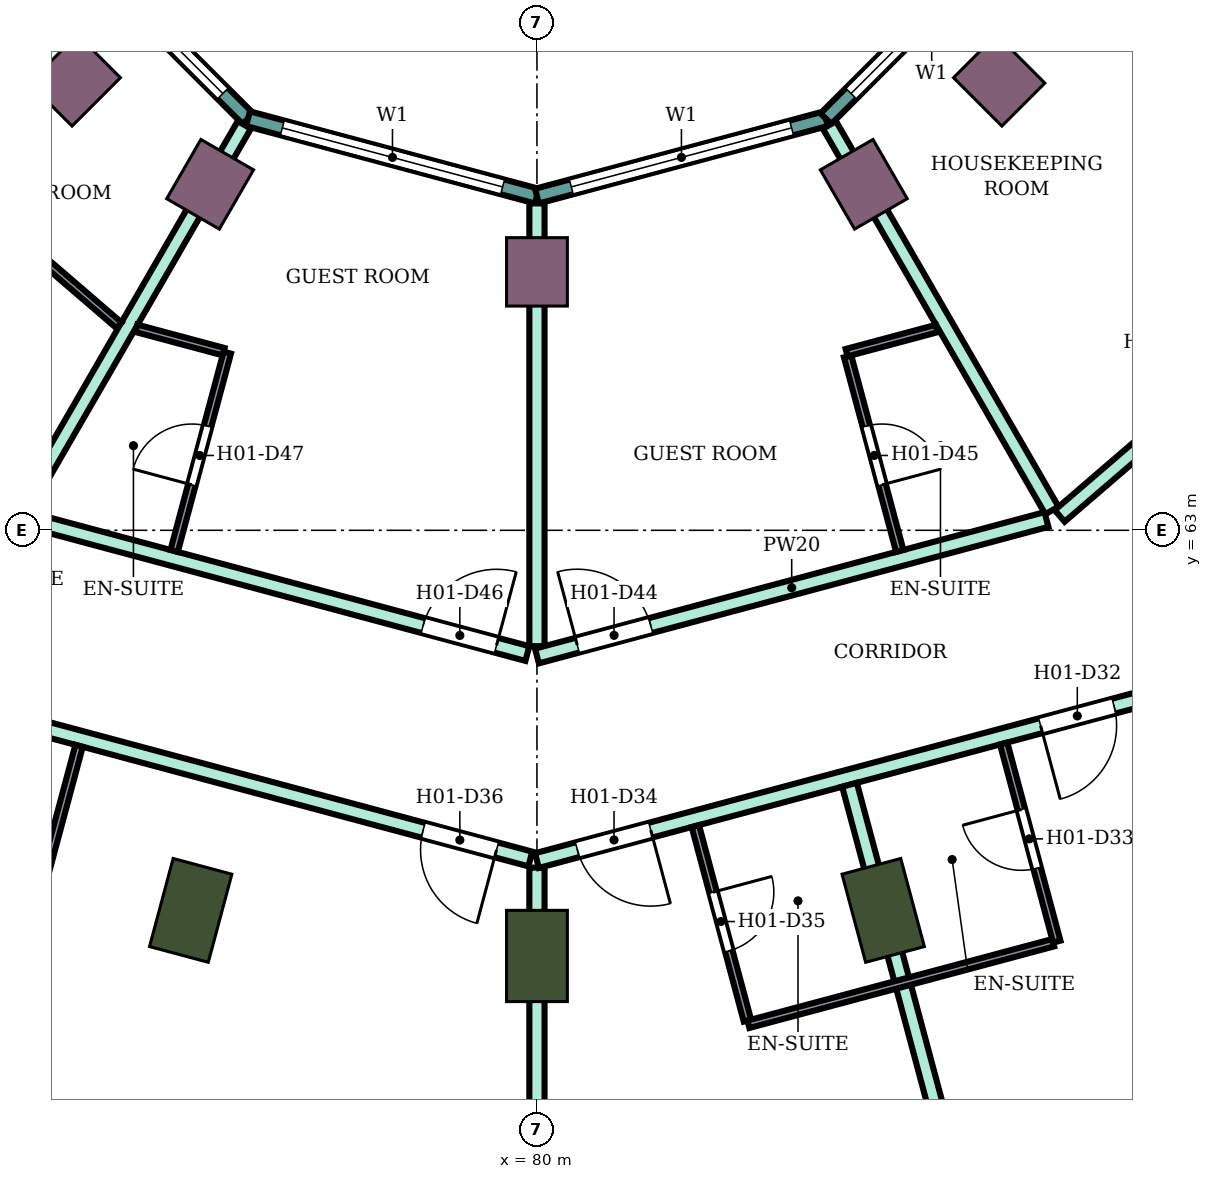
"""IFC4 building model, lengths in metres.
Left out: names, types, materials, properties, quantities, classifications, styles, units other than length and angle.
Written with IfcOpenShell. Run it as: python <this file> out.ifc"""

import sys

from ifc_helpers import new_model, si_unit, direction, frame, frame_2d, origin, origin_2d, place, context, subcontext, project, spatial, rectangle, extrude, element, fill, save


model = new_model("IFC4")
c1 = context("Model", 3, precision=1e-05, world=origin(), true_north=direction((0.0, 1.0)))
c2 = subcontext(c1, "Body", "Model", "MODEL_VIEW")
j1 = project(units=[si_unit("LENGTHUNIT", "METRE"), si_unit("PLANEANGLEUNIT", "RADIAN")], contexts=[c1])
p1 = place(None, origin())
s1 = spatial("IfcSite", under=j1, at=p1, CompositionType="ELEMENT")
p2 = place(p1, origin())
s2 = spatial("IfcBuilding", under=s1, at=p2, CompositionType="ELEMENT")
p3 = place(p2, frame((0.0, 0.0, 36.4)))
s3 = spatial("IfcBuildingStorey", under=s2, at=p3, CompositionType="ELEMENT", Elevation=36.4)
for number, where, z_axis, x_axis in (
    (1, (75.445, 58.0, 0.0), (0.0, 0.0, 1.0), (-0.259, -0.966, 0.0)),
    (2, (80.0, 57.4, 0.0), (0.0, 0.0, 1.0), (0.0, -1.0, 0.0)),
    (3, (84.555, 58.0, 0.0), (0.0, 0.0, 1.0), (0.259, -0.966, 0.0)),
):
    element("IfcColumn", number, at=place(p3, frame(where, z_axis=z_axis, x_axis=x_axis)), inside=s3, PredefinedType="COLUMN", context=c2, shape_type="SweptSolid", body=[
        extrude(rectangle(XDim=1.2, YDim=0.8, at=origin_2d()), origin(), (0.0, 0.0, 1.0), 3.8),
    ])
for number, where, z_axis, x_axis in (
    (4, (73.919, 68.919, 0.0), (0.0, 0.0, 1.0), (-0.707, -0.707, 0.0)),
    (5, (75.7, 67.552, 0.0), (0.0, 0.0, 1.0), (-0.5, -0.866, 0.0)),
    (6, (80.0, 66.4, 0.0), (0.0, 0.0, 1.0), (0.0, -1.0, 0.0)),
    (7, (84.3, 67.552, 0.0), (0.0, 0.0, 1.0), (0.5, -0.866, 0.0)),
    (8, (86.081, 68.919, 0.0), (0.0, 0.0, 1.0), (0.707, -0.707, 0.0)),
):
    element("IfcColumn", number, at=place(p3, frame(where, z_axis=z_axis, x_axis=x_axis)), inside=s3, PredefinedType="COLUMN", context=c2, shape_type="SweptSolid", body=[
        extrude(rectangle(XDim=0.9, YDim=0.8, at=origin_2d()), origin(), (0.0, 0.0, 1.0), 3.8),
    ])
p4 = place(p3, frame((73.415, 71.198, 0.0), z_axis=(0.0, 0.0, 1.0), x_axis=(0.707106781187, -0.707106781187, 0.0)))
e9 = element("IfcWall", 9, at=p4, inside=s3, PredefinedType="NOTDEFINED", context=c2, shape_type="SweptSolid", body=[
    extrude(rectangle(XDim=3.936, YDim=0.2, at=frame_2d((1.968, 0.0))), origin(), (0.0, 0.0, 1.0), 3.8),
])
p5 = place(p4, frame((0.468, 0.0, 0.9)))
e10 = element("IfcOpeningElement", 10, at=p5, cuts=e9, PredefinedType="OPENING", context=c2, shape_type="SweptSolid", body=[
    extrude(rectangle(XDim=3.0, YDim=2.3, at=frame_2d((1.5, 1.15))), frame((0.0, 0.11, 0.0), z_axis=(0.0, -1.0, 0.0), x_axis=(1.0, 0.0, 0.0)), (0.0, 0.0, 1.0), 0.22),
])
p6 = place(p3, frame((76.198, 68.415, 0.0), z_axis=(0.0, 0.0, 1.0), x_axis=(0.965933654434, -0.258789828301, 0.0)))
e11 = element("IfcWall", 11, at=p6, inside=s3, PredefinedType="NOTDEFINED", context=c2, shape_type="SweptSolid", body=[
    extrude(rectangle(XDim=3.936, YDim=0.2, at=frame_2d((1.968, 0.0))), origin(), (0.0, 0.0, 1.0), 3.8),
])
p7 = place(p6, frame((0.468, 0.0, 0.9)))
e12 = element("IfcOpeningElement", 12, at=p7, cuts=e11, PredefinedType="OPENING", context=c2, shape_type="SweptSolid", body=[
    extrude(rectangle(XDim=3.0, YDim=2.3, at=frame_2d((1.5, 1.15))), frame((0.0, 0.11, 0.0), z_axis=(0.0, -1.0, 0.0), x_axis=(1.0, 0.0, 0.0)), (0.0, 0.0, 1.0), 0.22),
])
p8 = place(p3, frame((80.0, 67.396, 0.0), z_axis=(0.0, 0.0, 1.0), x_axis=(0.965933654434, 0.258789828301, 0.0)))
e13 = element("IfcWall", 13, at=p8, inside=s3, PredefinedType="NOTDEFINED", context=c2, shape_type="SweptSolid", body=[
    extrude(rectangle(XDim=3.936, YDim=0.2, at=frame_2d((1.968, 0.0))), origin(), (0.0, 0.0, 1.0), 3.8),
])
p9 = place(p8, frame((0.468, 0.0, 0.9)))
e14 = element("IfcOpeningElement", 14, at=p9, cuts=e13, PredefinedType="OPENING", context=c2, shape_type="SweptSolid", body=[
    extrude(rectangle(XDim=3.0, YDim=2.3, at=frame_2d((1.5, 1.15))), frame((0.0, 0.11, 0.0), z_axis=(0.0, -1.0, 0.0), x_axis=(1.0, 0.0, 0.0)), (0.0, 0.0, 1.0), 0.22),
])
p10 = place(p3, frame((83.802, 68.415, 0.0), z_axis=(0.0, 0.0, 1.0), x_axis=(0.707106781187, 0.707106781187, 0.0)))
e15 = element("IfcWall", 15, at=p10, inside=s3, PredefinedType="NOTDEFINED", context=c2, shape_type="SweptSolid", body=[
    extrude(rectangle(XDim=3.936, YDim=0.2, at=frame_2d((1.968, 0.0))), origin(), (0.0, 0.0, 1.0), 3.8),
])
p11 = place(p10, frame((0.468, 0.0, 0.9)))
e16 = element("IfcOpeningElement", 16, at=p11, cuts=e15, PredefinedType="OPENING", context=c2, shape_type="SweptSolid", body=[
    extrude(rectangle(XDim=3.0, YDim=2.3, at=frame_2d((1.5, 1.15))), frame((0.0, 0.11, 0.0), z_axis=(0.0, -1.0, 0.0), x_axis=(1.0, 0.0, 0.0)), (0.0, 0.0, 1.0), 0.22),
])
p12 = place(p3, frame((71.877, 60.831, 0.0), z_axis=(0.0, 0.0, 1.0), x_axis=(0.965852509869, -0.259092510851, 0.0)))
e17 = element("IfcWall", 17, at=p12, inside=s3, PredefinedType="PARTITIONING", context=c2, shape_type="SweptSolid", body=[
    extrude(rectangle(XDim=8.32, YDim=0.2, at=frame_2d((4.16, 0.0))), origin(), (0.0, 0.0, 1.0), 3.35),
])
p13 = place(p12, frame((6.86, 0.0, 0.0)))
e18 = element("IfcOpeningElement", 18, at=p13, cuts=e17, PredefinedType="OPENING", context=c2, shape_type="SweptSolid", body=[
    extrude(rectangle(XDim=1.0, YDim=2.1, at=frame_2d((0.5, 1.05))), frame((0.0, 0.11, 0.0), z_axis=(0.0, -1.0, 0.0), x_axis=(1.0, 0.0, 0.0)), (0.0, 0.0, 1.0), 0.22),
])
p14 = place(p3, frame((73.297, 63.143, 0.0), z_axis=(0.0, 0.0, 1.0), x_axis=(0.965859030528, -0.25906820173, 0.0)))
e19 = element("IfcWall", 19, at=p14, inside=s3, PredefinedType="PARTITIONING", context=c2, shape_type="SweptSolid", body=[
    extrude(rectangle(XDim=6.81, YDim=0.2, at=frame_2d((3.405, 0.0))), origin(), (0.0, 0.0, 1.0), 3.35),
])
p15 = place(p14, frame((5.39, 0.0, 0.0)))
e20 = element("IfcOpeningElement", 20, at=p15, cuts=e19, PredefinedType="OPENING", context=c2, shape_type="SweptSolid", body=[
    extrude(rectangle(XDim=1.0, YDim=2.1, at=frame_2d((0.5, 1.05))), frame((0.0, 0.11, 0.0), z_axis=(0.0, -1.0, 0.0), x_axis=(1.0, 0.0, 0.0)), (0.0, 0.0, 1.0), 0.22),
])
p16 = place(p3, frame((73.171, 63.177, 0.0), z_axis=(0.0, 0.0, 1.0), x_axis=(0.500257106344, 0.865876912472, 0.0)))
e21 = element("IfcWall", 21, at=p16, inside=s3, PredefinedType="PARTITIONING", context=c2, shape_type="SweptSolid", body=[
    extrude(rectangle(XDim=5.955, YDim=0.2, at=frame_2d((2.978, 0.0))), origin(), (0.0, 0.0, 1.0), 3.35),
])
p17 = place(p3, frame((80.0, 51.801, 0.0), z_axis=(0.0, 0.0, 1.0), x_axis=(0.0, 1.0, 0.0)))
e22 = element("IfcWall", 22, at=p17, inside=s3, PredefinedType="PARTITIONING", context=c2, shape_type="SweptSolid", body=[
    extrude(rectangle(XDim=6.762, YDim=0.2, at=frame_2d((3.381, 0.0))), origin(), (0.0, 0.0, 1.0), 3.35),
])
p18 = place(p3, frame((80.0, 58.655, 0.0), z_axis=(0.0, 0.0, 1.0), x_axis=(0.965974635626, 0.258636817424, 0.0)))
e23 = element("IfcWall", 23, at=p18, inside=s3, PredefinedType="PARTITIONING", context=c2, shape_type="SweptSolid", body=[
    extrude(rectangle(XDim=8.36, YDim=0.2, at=frame_2d((4.18, 0.0))), origin(), (0.0, 0.0, 1.0), 3.35),
])
p19 = place(p18, frame((6.86, 0.0, 0.0)))
e24 = element("IfcOpeningElement", 24, at=p19, cuts=e23, PredefinedType="OPENING", context=c2, shape_type="SweptSolid", body=[
    extrude(rectangle(XDim=1.0, YDim=2.1, at=frame_2d((0.5, 1.05))), frame((0.0, 0.11, 0.0), z_axis=(0.0, -1.0, 0.0), x_axis=(1.0, 0.0, 0.0)), (0.0, 0.0, 1.0), 0.22),
])
p20 = place(p18, frame((0.55, 0.0, 0.0)))
e25 = element("IfcOpeningElement", 25, at=p20, cuts=e23, PredefinedType="OPENING", context=c2, shape_type="SweptSolid", body=[
    extrude(rectangle(XDim=1.0, YDim=2.1, at=frame_2d((0.5, 1.05))), frame((0.0, 0.11, 0.0), z_axis=(0.0, -1.0, 0.0), x_axis=(1.0, 0.0, 0.0)), (0.0, 0.0, 1.0), 0.22),
])
p21 = place(p3, frame((80.0, 61.476, 0.0), z_axis=(0.0, 0.0, 1.0), x_axis=(0.0, 1.0, 0.0)))
e26 = element("IfcWall", 26, at=p21, inside=s3, PredefinedType="PARTITIONING", context=c2, shape_type="SweptSolid", body=[
    extrude(rectangle(XDim=5.825, YDim=0.2, at=frame_2d((2.913, 0.0))), origin(), (0.0, 0.0, 1.0), 3.35),
])
p22 = place(p3, frame((80.0, 61.346, 0.0), z_axis=(0.0, 0.0, 1.0), x_axis=(0.965924181808, 0.258825182312, 0.0)))
e27 = element("IfcWall", 27, at=p22, inside=s3, PredefinedType="PARTITIONING", context=c2, shape_type="SweptSolid", body=[
    extrude(rectangle(XDim=6.94, YDim=0.2, at=frame_2d((3.47, 0.0))), origin(), (0.0, 0.0, 1.0), 3.35),
])
p23 = place(p22, frame((0.55, 0.0, 0.0)))
e28 = element("IfcOpeningElement", 28, at=p23, cuts=e27, PredefinedType="OPENING", context=c2, shape_type="SweptSolid", body=[
    extrude(rectangle(XDim=1.0, YDim=2.1, at=frame_2d((0.5, 1.05))), frame((0.0, 0.11, 0.0), z_axis=(0.0, -1.0, 0.0), x_axis=(1.0, 0.0, 0.0)), (0.0, 0.0, 1.0), 0.22),
])
p24 = place(p3, frame((83.848, 68.333, 0.0), z_axis=(0.0, 0.0, 1.0), x_axis=(0.499951054106, -0.866053660865, 0.0)))
e29 = element("IfcWall", 29, at=p24, inside=s3, PredefinedType="PARTITIONING", context=c2, shape_type="SweptSolid", body=[
    extrude(rectangle(XDim=5.855, YDim=0.2, at=frame_2d((2.927, 0.0))), origin(), (0.0, 0.0, 1.0), 3.35),
])
p25 = place(p3, frame((84.112, 59.652, 0.0), z_axis=(0.0, 0.0, 1.0), x_axis=(0.258791091927, -0.965933315886, 0.0)))
e30 = element("IfcWall", 30, at=p25, inside=s3, PredefinedType="PARTITIONING", context=c2, shape_type="SweptSolid", body=[
    extrude(rectangle(XDim=9.909, YDim=0.2, at=frame_2d((4.955, 0.0))), origin(), (0.0, 0.0, 1.0), 3.35),
])
p26 = place(p3, frame((86.877, 63.189, 0.0), z_axis=(0.0, 0.0, 1.0), x_axis=(0.758075808328, 0.652166442581, 0.0)))
e31 = element("IfcWall", 31, at=p26, inside=s3, PredefinedType="PARTITIONING", context=c2, shape_type="SweptSolid", body=[
    extrude(rectangle(XDim=5.23, YDim=0.2, at=frame_2d((2.615, 0.0))), origin(), (0.0, 0.0, 1.0), 3.35),
])
p27 = place(p26, frame((2.165, 0.0, 0.0)))
e32 = element("IfcOpeningElement", 32, at=p27, cuts=e31, PredefinedType="OPENING", context=c2, shape_type="SweptSolid", body=[
    extrude(rectangle(XDim=0.9, YDim=2.1, at=frame_2d((0.45, 1.05))), frame((0.0, 0.11, 0.0), z_axis=(0.0, -1.0, 0.0), x_axis=(1.0, 0.0, 0.0)), (0.0, 0.0, 1.0), 0.22),
])
p28 = place(p3, frame((73.277, 57.557, 0.0), z_axis=(0.0, 0.0, 1.0), x_axis=(0.258928960762, 0.965896367774, 0.0)))
e33 = element("IfcWall", 33, at=p28, inside=s3, PredefinedType="PARTITIONING", context=c2, shape_type="SweptSolid", body=[
    extrude(rectangle(XDim=2.699, YDim=0.1, at=frame_2d((1.35, 0.0))), origin(), (0.0, 0.0, 1.0), 3.35),
])
p29 = place(p3, frame((73.357, 66.681, 0.0), z_axis=(0.0, 0.0, 1.0), x_axis=(0.758263469747, -0.651948242154, 0.0)))
e34 = element("IfcWall", 34, at=p29, inside=s3, PredefinedType="PARTITIONING", context=c2, shape_type="SweptSolid", body=[
    extrude(rectangle(XDim=1.511, YDim=0.1, at=frame_2d((0.755, 0.0))), origin(), (0.0, 0.0, 1.0), 3.35),
])
p30 = place(p3, frame((74.729, 65.657, 0.0), z_axis=(0.0, 0.0, 1.0), x_axis=(0.965948051503, -0.258736085224, 0.0)))
e35 = element("IfcWall", 35, at=p30, inside=s3, PredefinedType="PARTITIONING", context=c2, shape_type="SweptSolid", body=[
    extrude(rectangle(XDim=1.189, YDim=0.1, at=frame_2d((0.594, 0.0))), origin(), (0.0, 0.0, 1.0), 3.35),
])
p31 = place(p3, frame((75.227, 62.729, 0.0), z_axis=(0.0, 0.0, 1.0), x_axis=(0.258945475746, 0.965891940432, 0.0)))
e36 = element("IfcWall", 36, at=p31, inside=s3, PredefinedType="PARTITIONING", context=c2, shape_type="SweptSolid", body=[
    extrude(rectangle(XDim=2.7, YDim=0.1, at=frame_2d((1.35, 0.0))), origin(), (0.0, 0.0, 1.0), 3.35),
])
p32 = place(p31, frame((0.9, 0.0, 0.0)))
e37 = element("IfcOpeningElement", 37, at=p32, cuts=e36, PredefinedType="OPENING", context=c2, shape_type="SweptSolid", body=[
    extrude(rectangle(XDim=0.8, YDim=2.1, at=frame_2d((0.4, 1.05))), frame((0.0, 0.06, 0.0), z_axis=(0.0, -1.0, 0.0), x_axis=(1.0, 0.0, 0.0)), (0.0, 0.0, 1.0), 0.12),
])
p33 = place(p3, frame((82.084, 59.108, 0.0), z_axis=(0.0, 0.0, 1.0), x_axis=(0.258591746437, -0.965986702121, 0.0)))
e38 = element("IfcWall", 38, at=p33, inside=s3, PredefinedType="PARTITIONING", context=c2, shape_type="SweptSolid", body=[
    extrude(rectangle(XDim=2.649, YDim=0.1, at=frame_2d((1.325, 0.0))), origin(), (0.0, 0.0, 1.0), 3.35),
])
p34 = place(p33, frame((0.9, 0.0, 0.0)))
e39 = element("IfcOpeningElement", 39, at=p34, cuts=e38, PredefinedType="OPENING", context=c2, shape_type="SweptSolid", body=[
    extrude(rectangle(XDim=0.8, YDim=2.1, at=frame_2d((0.4, 1.05))), frame((0.0, 0.06, 0.0), z_axis=(0.0, -1.0, 0.0), x_axis=(1.0, 0.0, 0.0)), (0.0, 0.0, 1.0), 0.12),
])
p35 = place(p3, frame((82.782, 56.501, 0.0), z_axis=(0.0, 0.0, 1.0), x_axis=(0.965999228418, 0.258544949083, 0.0)))
e40 = element("IfcWall", 40, at=p35, inside=s3, PredefinedType="PARTITIONING", context=c2, shape_type="SweptSolid", body=[
    extrude(rectangle(XDim=4.15, YDim=0.1, at=frame_2d((2.075, 0.0))), origin(), (0.0, 0.0, 1.0), 3.35),
])
p36 = place(p3, frame((84.087, 65.289, 0.0), z_axis=(0.0, 0.0, 1.0), x_axis=(0.258929459649, -0.965896234037, 0.0)))
e41 = element("IfcWall", 41, at=p36, inside=s3, PredefinedType="PARTITIONING", context=c2, shape_type="SweptSolid", body=[
    extrude(rectangle(XDim=2.65, YDim=0.1, at=frame_2d((1.325, 0.0))), origin(), (0.0, 0.0, 1.0), 3.35),
])
p37 = place(p36, frame((0.95, 0.0, 0.0)))
e42 = element("IfcOpeningElement", 42, at=p37, cuts=e41, PredefinedType="OPENING", context=c2, shape_type="SweptSolid", body=[
    extrude(rectangle(XDim=0.8, YDim=2.1, at=frame_2d((0.4, 1.05))), frame((0.0, 0.06, 0.0), z_axis=(0.0, -1.0, 0.0), x_axis=(1.0, 0.0, 0.0)), (0.0, 0.0, 1.0), 0.12),
])
p38 = place(p3, frame((84.074, 65.337, 0.0), z_axis=(0.0, 0.0, 1.0), x_axis=(0.965914351064, 0.258861867428, 0.0)))
e43 = element("IfcWall", 43, at=p38, inside=s3, PredefinedType="PARTITIONING", context=c2, shape_type="SweptSolid", body=[
    extrude(rectangle(XDim=1.229, YDim=0.1, at=frame_2d((0.615, 0.0))), origin(), (0.0, 0.0, 1.0), 3.35),
])
p39 = place(p3, frame((86.14, 60.196, 0.0), z_axis=(0.0, 0.0, 1.0), x_axis=(0.258945475746, -0.965891940432, 0.0)))
e44 = element("IfcWall", 44, at=p39, inside=s3, PredefinedType="PARTITIONING", context=c2, shape_type="SweptSolid", body=[
    extrude(rectangle(XDim=2.7, YDim=0.1, at=frame_2d((1.35, 0.0))), origin(), (0.0, 0.0, 1.0), 3.35),
])
p40 = place(p39, frame((0.9, 0.0, 0.0)))
e45 = element("IfcOpeningElement", 45, at=p40, cuts=e44, PredefinedType="OPENING", context=c2, shape_type="SweptSolid", body=[
    extrude(rectangle(XDim=0.8, YDim=2.1, at=frame_2d((0.4, 1.05))), frame((0.0, 0.06, 0.0), z_axis=(0.0, -1.0, 0.0), x_axis=(1.0, 0.0, 0.0)), (0.0, 0.0, 1.0), 0.12),
])
p41 = place(p5, origin())
e46 = element("IfcWindow", 46, at=p41, inside=s3, PartitioningType="SINGLE_PANEL", PredefinedType="WINDOW", context=c2, shape_type="SweptSolid", body=[
    extrude(rectangle(XDim=3.0, YDim=2.3, at=frame_2d((1.5, 1.15))), frame((0.0, 0.03, 0.0), z_axis=(0.0, -1.0, 0.0), x_axis=(1.0, 0.0, 0.0)), (0.0, 0.0, 1.0), 0.06),
])
fill(e10, e46)
p42 = place(p7, origin())
e47 = element("IfcWindow", 47, at=p42, inside=s3, PartitioningType="SINGLE_PANEL", PredefinedType="WINDOW", context=c2, shape_type="SweptSolid", body=[
    extrude(rectangle(XDim=3.0, YDim=2.3, at=frame_2d((1.5, 1.15))), frame((0.0, 0.03, 0.0), z_axis=(0.0, -1.0, 0.0), x_axis=(1.0, 0.0, 0.0)), (0.0, 0.0, 1.0), 0.06),
])
fill(e12, e47)
p43 = place(p9, origin())
e48 = element("IfcWindow", 48, at=p43, inside=s3, PartitioningType="SINGLE_PANEL", PredefinedType="WINDOW", context=c2, shape_type="SweptSolid", body=[
    extrude(rectangle(XDim=3.0, YDim=2.3, at=frame_2d((1.5, 1.15))), frame((0.0, 0.03, 0.0), z_axis=(0.0, -1.0, 0.0), x_axis=(1.0, 0.0, 0.0)), (0.0, 0.0, 1.0), 0.06),
])
fill(e14, e48)
p44 = place(p11, origin())
e49 = element("IfcWindow", 49, at=p44, inside=s3, PartitioningType="SINGLE_PANEL", PredefinedType="WINDOW", context=c2, shape_type="SweptSolid", body=[
    extrude(rectangle(XDim=3.0, YDim=2.3, at=frame_2d((1.5, 1.15))), frame((0.0, 0.03, 0.0), z_axis=(0.0, -1.0, 0.0), x_axis=(1.0, 0.0, 0.0)), (0.0, 0.0, 1.0), 0.06),
])
fill(e16, e49)
p45 = place(p19, frame((1.0, 0.0, 0.0), z_axis=(0.0, 0.0, 1.0), x_axis=(-1.0, 0.0, 0.0)))
e50 = element("IfcDoor", 50, at=p45, inside=s3, OperationType="SINGLE_SWING_RIGHT", PredefinedType="DOOR", context=c2, shape_type="SweptSolid", body=[
    extrude(rectangle(XDim=1.0, YDim=2.1, at=frame_2d((0.5, 1.05))), frame((0.0, 0.025, 0.0), z_axis=(0.0, -1.0, 0.0), x_axis=(1.0, 0.0, 0.0)), (0.0, 0.0, 1.0), 0.05),
])
fill(e24, e50)
p46 = place(p40, frame((0.8, 0.0, 0.0), z_axis=(0.0, 0.0, 1.0), x_axis=(-1.0, 0.0, 0.0)))
e51 = element("IfcDoor", 51, at=p46, inside=s3, OperationType="SINGLE_SWING_RIGHT", PredefinedType="DOOR", context=c2, shape_type="SweptSolid", body=[
    extrude(rectangle(XDim=0.8, YDim=2.1, at=frame_2d((0.4, 1.05))), frame((0.0, 0.025, 0.0), z_axis=(0.0, -1.0, 0.0), x_axis=(1.0, 0.0, 0.0)), (0.0, 0.0, 1.0), 0.05),
])
fill(e45, e51)
p47 = place(p20, frame((1.0, 0.0, 0.0), z_axis=(0.0, 0.0, 1.0), x_axis=(-1.0, 0.0, 0.0)))
e52 = element("IfcDoor", 52, at=p47, inside=s3, OperationType="SINGLE_SWING_LEFT", PredefinedType="DOOR", context=c2, shape_type="SweptSolid", body=[
    extrude(rectangle(XDim=1.0, YDim=2.1, at=frame_2d((0.5, 1.05))), frame((0.0, 0.025, 0.0), z_axis=(0.0, -1.0, 0.0), x_axis=(1.0, 0.0, 0.0)), (0.0, 0.0, 1.0), 0.05),
])
fill(e25, e52)
p48 = place(p34, origin())
e53 = element("IfcDoor", 53, at=p48, inside=s3, OperationType="SINGLE_SWING_LEFT", PredefinedType="DOOR", context=c2, shape_type="SweptSolid", body=[
    extrude(rectangle(XDim=0.8, YDim=2.1, at=frame_2d((0.4, 1.05))), frame((0.0, 0.025, 0.0), z_axis=(0.0, -1.0, 0.0), x_axis=(1.0, 0.0, 0.0)), (0.0, 0.0, 1.0), 0.05),
])
fill(e39, e53)
p49 = place(p13, frame((1.0, 0.0, 0.0), z_axis=(0.0, 0.0, 1.0), x_axis=(-1.0, 0.0, 0.0)))
e54 = element("IfcDoor", 54, at=p49, inside=s3, OperationType="SINGLE_SWING_LEFT", PredefinedType="DOOR", context=c2, shape_type="SweptSolid", body=[
    extrude(rectangle(XDim=1.0, YDim=2.1, at=frame_2d((0.5, 1.05))), frame((0.0, 0.025, 0.0), z_axis=(0.0, -1.0, 0.0), x_axis=(1.0, 0.0, 0.0)), (0.0, 0.0, 1.0), 0.05),
])
fill(e18, e54)
p50 = place(p23, origin())
e55 = element("IfcDoor", 55, at=p50, inside=s3, OperationType="SINGLE_SWING_LEFT", PredefinedType="DOOR", context=c2, shape_type="SweptSolid", body=[
    extrude(rectangle(XDim=1.0, YDim=2.1, at=frame_2d((0.5, 1.05))), frame((0.0, 0.025, 0.0), z_axis=(0.0, -1.0, 0.0), x_axis=(1.0, 0.0, 0.0)), (0.0, 0.0, 1.0), 0.05),
])
fill(e28, e55)
p51 = place(p37, origin())
e56 = element("IfcDoor", 56, at=p51, inside=s3, OperationType="SINGLE_SWING_RIGHT", PredefinedType="DOOR", context=c2, shape_type="SweptSolid", body=[
    extrude(rectangle(XDim=0.8, YDim=2.1, at=frame_2d((0.4, 1.05))), frame((0.0, 0.025, 0.0), z_axis=(0.0, -1.0, 0.0), x_axis=(1.0, 0.0, 0.0)), (0.0, 0.0, 1.0), 0.05),
])
fill(e42, e56)
p52 = place(p15, origin())
e57 = element("IfcDoor", 57, at=p52, inside=s3, OperationType="SINGLE_SWING_RIGHT", PredefinedType="DOOR", context=c2, shape_type="SweptSolid", body=[
    extrude(rectangle(XDim=1.0, YDim=2.1, at=frame_2d((0.5, 1.05))), frame((0.0, 0.025, 0.0), z_axis=(0.0, -1.0, 0.0), x_axis=(1.0, 0.0, 0.0)), (0.0, 0.0, 1.0), 0.05),
])
fill(e20, e57)
p53 = place(p32, origin())
e58 = element("IfcDoor", 58, at=p53, inside=s3, OperationType="SINGLE_SWING_LEFT", PredefinedType="DOOR", context=c2, shape_type="SweptSolid", body=[
    extrude(rectangle(XDim=0.8, YDim=2.1, at=frame_2d((0.4, 1.05))), frame((0.0, 0.025, 0.0), z_axis=(0.0, -1.0, 0.0), x_axis=(1.0, 0.0, 0.0)), (0.0, 0.0, 1.0), 0.05),
])
fill(e37, e58)
save(model, sys.argv[1])
